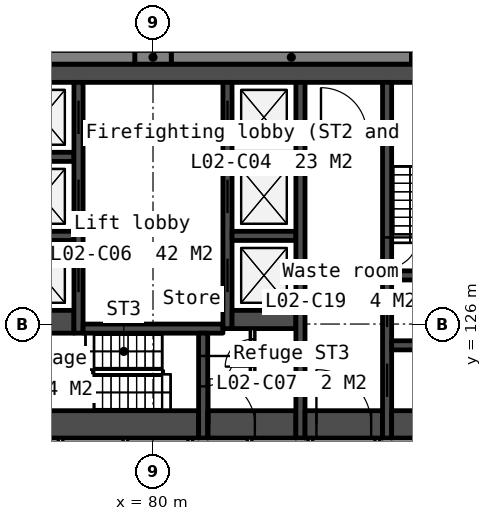
"""IFC4 building model, lengths in metres.
Left out: names, types, materials, properties, quantities, classifications, styles, units other than length and angle.
Written with IfcOpenShell. Run it as: python <this file> out.ifc"""

import sys

from ifc_helpers import new_model, si_unit, direction, frame, frame_2d, origin, place, context, subcontext, project, spatial, rectangle, extrude, element, fill, save


model = new_model("IFC4")
c1 = context("Model", 3, precision=1e-05, world=origin(), true_north=direction((0.0, 1.0)))
c2 = subcontext(c1, "Body", "Model", "MODEL_VIEW")
j1 = project(units=[si_unit("LENGTHUNIT", "METRE"), si_unit("PLANEANGLEUNIT", "RADIAN")], contexts=[c1])
p1 = place(None, origin())
s1 = spatial("IfcSite", under=j1, at=p1, CompositionType="ELEMENT")
p2 = place(p1, origin())
s2 = spatial("IfcBuilding", under=s1, at=p2, CompositionType="ELEMENT")
p3 = place(p2, frame((0.0, 0.0, 13.5)))
s3 = spatial("IfcBuildingStorey", under=s2, at=p3, CompositionType="ELEMENT", Elevation=13.5)
p4 = place(p3, frame((66.0, 134.25, 0.0), z_axis=(0.0, 0.0, 1.0), x_axis=(1.0, 0.0, 0.0)))
e1 = element("IfcWall", 1, at=p4, inside=s3, PredefinedType="SOLIDWALL", context=c2, shape_type="SweptSolid", body=[
    extrude(rectangle(XDim=28.0, YDim=0.6, at=frame_2d((14.0, 0.0))), origin(), (0.0, 0.0, 1.0), 5.75),
])
for number, where, z_axis, x_axis in (
    (2, (75.3, 131.5, 0.0), (0.0, 0.0, 1.0), (1.0, 0.0, 0.0)),
    (3, (75.3, 128.9, 0.0), (0.0, 0.0, 1.0), (1.0, 0.0, 0.0)),
):
    element("IfcWall", number, at=place(p3, frame(where, z_axis=z_axis, x_axis=x_axis)), inside=s3, PredefinedType="SOLIDWALL", context=c2, shape_type="SweptSolid", body=[
        extrude(rectangle(XDim=2.1, YDim=0.3, at=frame_2d((1.05, 0.0))), origin(), (0.0, 0.0, 1.0), 5.75),
    ])
p5 = place(p3, frame((75.3, 126.075, 0.0), z_axis=(0.0, 0.0, 1.0), x_axis=(1.0, 0.0, 0.0)))
e4 = element("IfcWall", 4, at=p5, inside=s3, PredefinedType="SOLIDWALL", context=c2, shape_type="SweptSolid", body=[
    extrude(rectangle(XDim=2.1, YDim=0.75, at=frame_2d((1.05, 0.0))), origin(), (0.0, 0.0, 1.0), 5.75),
])
p6 = place(p3, frame((75.3, 122.7, 0.0), z_axis=(0.0, 0.0, 1.0), x_axis=(1.0, 0.0, 0.0)))
e5 = element("IfcWall", 5, at=p6, inside=s3, PredefinedType="SOLIDWALL", context=c2, shape_type="SweptSolid", body=[
    extrude(rectangle(XDim=6.2, YDim=0.9, at=frame_2d((3.1, 0.0))), origin(), (0.0, 0.0, 1.0), 5.75),
])
p7 = place(p3, frame((76.958, 122.25, 0.0), z_axis=(0.0, 0.0, 1.0), x_axis=(0.0, -1.0, 0.0)))
e6 = element("IfcWall", 6, at=p7, inside=s3, PredefinedType="PARTITIONING", context=c2, shape_type="SweptSolid", body=[
    extrude(rectangle(XDim=2.1, YDim=0.15, at=frame_2d((1.05, 0.0))), origin(), (0.0, 0.0, 1.0), 5.75),
])
p8 = place(p3, frame((77.55, 133.95, 0.0), z_axis=(0.0, 0.0, 1.0), x_axis=(0.0, -1.0, 0.0)))
e7 = element("IfcWall", 7, at=p8, inside=s3, PredefinedType="SOLIDWALL", context=c2, shape_type="SweptSolid", body=[
    extrude(rectangle(XDim=8.25, YDim=0.3, at=frame_2d((4.125, 0.0))), origin(), (0.0, 0.0, 1.0), 5.75),
])
p9 = place(p8, frame((0.6, 0.0, 0.0)))
e8 = element("IfcOpeningElement", 8, at=p9, cuts=e7, PredefinedType="OPENING", context=c2, shape_type="SweptSolid", body=[
    extrude(rectangle(XDim=1.1, YDim=2.1, at=frame_2d((0.55, 1.05))), frame((0.0, 0.16, 0.0), z_axis=(0.0, -1.0, 0.0), x_axis=(1.0, 0.0, 0.0)), (0.0, 0.0, 1.0), 0.32),
])
p10 = place(p8, frame((3.2, 0.0, 0.0)))
e9 = element("IfcOpeningElement", 9, at=p10, cuts=e7, PredefinedType="OPENING", context=c2, shape_type="SweptSolid", body=[
    extrude(rectangle(XDim=1.1, YDim=2.1, at=frame_2d((0.55, 1.05))), frame((0.0, 0.16, 0.0), z_axis=(0.0, -1.0, 0.0), x_axis=(1.0, 0.0, 0.0)), (0.0, 0.0, 1.0), 0.32),
])
p11 = place(p8, frame((5.8, 0.0, 0.0)))
e10 = element("IfcOpeningElement", 10, at=p11, cuts=e7, PredefinedType="OPENING", context=c2, shape_type="SweptSolid", body=[
    extrude(rectangle(XDim=1.1, YDim=2.1, at=frame_2d((0.55, 1.05))), frame((0.0, 0.16, 0.0), z_axis=(0.0, -1.0, 0.0), x_axis=(1.0, 0.0, 0.0)), (0.0, 0.0, 1.0), 0.32),
])
p12 = place(p3, frame((77.7, 125.85, 0.0), z_axis=(0.0, 0.0, 1.0), x_axis=(1.0, 0.0, 0.0)))
e11 = element("IfcWall", 11, at=p12, inside=s3, PredefinedType="SOLIDWALL", context=c2, shape_type="SweptSolid", body=[
    extrude(rectangle(XDim=4.6, YDim=0.3, at=frame_2d((2.3, 0.0))), origin(), (0.0, 0.0, 1.0), 5.75),
])
for number, where, z_axis, x_axis in (
    (12, (79.092, 122.25, 0.0), (0.0, 0.0, 1.0), (0.0, -1.0, 0.0)),
    (13, (81.225, 122.25, 0.0), (0.0, 0.0, 1.0), (0.0, -1.0, 0.0)),
):
    element("IfcWall", number, at=place(p3, frame(where, z_axis=z_axis, x_axis=x_axis)), inside=s3, PredefinedType="PARTITIONING", context=c2, shape_type="SweptSolid", body=[
        extrude(rectangle(XDim=2.1, YDim=0.15, at=frame_2d((1.05, 0.0))), origin(), (0.0, 0.0, 1.0), 5.75),
    ])
p13 = place(p3, frame((81.65, 125.7, 0.0), z_axis=(0.0, 0.0, 1.0), x_axis=(0.0, -1.0, 0.0)))
e14 = element("IfcWall", 14, at=p13, inside=s3, PredefinedType="SOLIDWALL", context=c2, shape_type="SweptSolid", body=[
    extrude(rectangle(XDim=3.45, YDim=0.3, at=frame_2d((1.725, 0.0))), origin(), (0.0, 0.0, 1.0), 5.75),
])
p14 = place(p13, frame((0.75, 0.0, 0.0)))
e15 = element("IfcOpeningElement", 15, at=p14, cuts=e14, PredefinedType="OPENING", context=c2, shape_type="SweptSolid", body=[
    extrude(rectangle(XDim=1.0, YDim=2.1, at=frame_2d((0.5, 1.05))), frame((0.0, 0.16, 0.0), z_axis=(0.0, -1.0, 0.0), x_axis=(1.0, 0.0, 0.0)), (0.0, 0.0, 1.0), 0.32),
])
p15 = place(p3, frame((81.8, 122.7, 0.0), z_axis=(0.0, 0.0, 1.0), x_axis=(1.0, 0.0, 0.0)))
e16 = element("IfcWall", 16, at=p15, inside=s3, PredefinedType="SOLIDWALL", context=c2, shape_type="SweptSolid", body=[
    extrude(rectangle(XDim=2.9, YDim=0.9, at=frame_2d((1.45, 0.0))), origin(), (0.0, 0.0, 1.0), 5.75),
])
p16 = place(p15, frame((0.05, 0.0, 0.0)))
e17 = element("IfcOpeningElement", 17, at=p16, cuts=e16, PredefinedType="OPENING", context=c2, shape_type="SweptSolid", body=[
    extrude(rectangle(XDim=1.5, YDim=2.1, at=frame_2d((0.75, 1.05))), frame((0.0, 0.46, 0.0), z_axis=(0.0, -1.0, 0.0), x_axis=(1.0, 0.0, 0.0)), (0.0, 0.0, 1.0), 0.92),
])
p17 = place(p3, frame((82.45, 133.95, 0.0), z_axis=(0.0, 0.0, 1.0), x_axis=(0.0, -1.0, 0.0)))
e18 = element("IfcWall", 18, at=p17, inside=s3, PredefinedType="SOLIDWALL", context=c2, shape_type="SweptSolid", body=[
    extrude(rectangle(XDim=8.1, YDim=0.3, at=frame_2d((4.05, 0.0))), origin(), (0.0, 0.0, 1.0), 5.75),
])
p18 = place(p17, frame((0.6, 0.0, 0.0)))
e19 = element("IfcOpeningElement", 19, at=p18, cuts=e18, PredefinedType="OPENING", context=c2, shape_type="SweptSolid", body=[
    extrude(rectangle(XDim=1.1, YDim=2.1, at=frame_2d((0.55, 1.05))), frame((0.0, 0.16, 0.0), z_axis=(0.0, -1.0, 0.0), x_axis=(1.0, 0.0, 0.0)), (0.0, 0.0, 1.0), 0.32),
])
p19 = place(p17, frame((3.2, 0.0, 0.0)))
e20 = element("IfcOpeningElement", 20, at=p19, cuts=e18, PredefinedType="OPENING", context=c2, shape_type="SweptSolid", body=[
    extrude(rectangle(XDim=1.1, YDim=2.1, at=frame_2d((0.55, 1.05))), frame((0.0, 0.16, 0.0), z_axis=(0.0, -1.0, 0.0), x_axis=(1.0, 0.0, 0.0)), (0.0, 0.0, 1.0), 0.32),
])
p20 = place(p17, frame((5.8, 0.0, 0.0)))
e21 = element("IfcOpeningElement", 21, at=p20, cuts=e18, PredefinedType="OPENING", context=c2, shape_type="SweptSolid", body=[
    extrude(rectangle(XDim=1.1, YDim=2.1, at=frame_2d((0.55, 1.05))), frame((0.0, 0.16, 0.0), z_axis=(0.0, -1.0, 0.0), x_axis=(1.0, 0.0, 0.0)), (0.0, 0.0, 1.0), 0.32),
])
for number, where, z_axis, x_axis in (
    (22, (82.6, 131.5, 0.0), (0.0, 0.0, 1.0), (1.0, 0.0, 0.0)),
    (23, (82.6, 128.9, 0.0), (0.0, 0.0, 1.0), (1.0, 0.0, 0.0)),
):
    element("IfcWall", number, at=place(p3, frame(where, z_axis=z_axis, x_axis=x_axis)), inside=s3, PredefinedType="SOLIDWALL", context=c2, shape_type="SweptSolid", body=[
        extrude(rectangle(XDim=2.1, YDim=0.3, at=frame_2d((1.05, 0.0))), origin(), (0.0, 0.0, 1.0), 5.75),
    ])
p21 = place(p3, frame((82.6, 126.15, 0.0), z_axis=(0.0, 0.0, 1.0), x_axis=(1.0, 0.0, 0.0)))
e24 = element("IfcWall", 24, at=p21, inside=s3, PredefinedType="SOLIDWALL", context=c2, shape_type="SweptSolid", body=[
    extrude(rectangle(XDim=2.1, YDim=0.6, at=frame_2d((1.05, 0.0))), origin(), (0.0, 0.0, 1.0), 5.75),
])
p22 = place(p3, frame((83.175, 122.25, 0.0), z_axis=(0.0, 0.0, 1.0), x_axis=(0.0, -1.0, 0.0)))
e25 = element("IfcWall", 25, at=p22, inside=s3, PredefinedType="PARTITIONING", context=c2, shape_type="SweptSolid", body=[
    extrude(rectangle(XDim=2.1, YDim=0.15, at=frame_2d((1.05, 0.0))), origin(), (0.0, 0.0, 1.0), 5.75),
])
p23 = place(p3, frame((83.275, 125.85, 0.0), z_axis=(0.0, 0.0, 1.0), x_axis=(0.0, -1.0, 0.0)))
e26 = element("IfcWall", 26, at=p23, inside=s3, PredefinedType="PARTITIONING", context=c2, shape_type="SweptSolid", body=[
    extrude(rectangle(XDim=1.75, YDim=0.15, at=frame_2d((0.875, 0.0))), origin(), (0.0, 0.0, 1.0), 5.75),
])
p24 = place(p23, frame((0.35, 0.0, 0.0)))
e27 = element("IfcOpeningElement", 27, at=p24, cuts=e26, PredefinedType="OPENING", context=c2, shape_type="SweptSolid", body=[
    extrude(rectangle(XDim=0.9, YDim=2.1, at=frame_2d((0.45, 1.05))), frame((0.0, 0.085, 0.0), z_axis=(0.0, -1.0, 0.0), x_axis=(1.0, 0.0, 0.0)), (0.0, 0.0, 1.0), 0.17),
])
p25 = place(p3, frame((83.35, 124.175, 0.0), z_axis=(0.0, 0.0, 1.0), x_axis=(1.0, 0.0, 0.0)))
e28 = element("IfcWall", 28, at=p25, inside=s3, PredefinedType="PARTITIONING", context=c2, shape_type="SweptSolid", body=[
    extrude(rectangle(XDim=1.35, YDim=0.15, at=frame_2d((0.675, 0.0))), origin(), (0.0, 0.0, 1.0), 5.75),
])
p26 = place(p3, frame((84.85, 133.95, 0.0), z_axis=(0.0, 0.0, 1.0), x_axis=(0.0, -1.0, 0.0)))
e29 = element("IfcWall", 29, at=p26, inside=s3, PredefinedType="SOLIDWALL", context=c2, shape_type="SweptSolid", body=[
    extrude(rectangle(XDim=11.7, YDim=0.3, at=frame_2d((5.85, 0.0))), origin(), (0.0, 0.0, 1.0), 5.75),
])
p27 = place(p3, frame((85.0, 132.275, 0.0), z_axis=(0.0, 0.0, 1.0), x_axis=(1.0, 0.0, 0.0)))
e30 = element("IfcWall", 30, at=p27, inside=s3, PredefinedType="PARTITIONING", context=c2, shape_type="SweptSolid", body=[
    extrude(rectangle(XDim=2.55, YDim=0.15, at=frame_2d((1.275, 0.0))), origin(), (0.0, 0.0, 1.0), 5.75),
])
p28 = place(p27, frame((0.525, 0.0, 0.0)))
e31 = element("IfcOpeningElement", 31, at=p28, cuts=e30, PredefinedType="OPENING", context=c2, shape_type="SweptSolid", body=[
    extrude(rectangle(XDim=1.5, YDim=2.1, at=frame_2d((0.75, 1.05))), frame((0.0, 0.085, 0.0), z_axis=(0.0, -1.0, 0.0), x_axis=(1.0, 0.0, 0.0)), (0.0, 0.0, 1.0), 0.17),
])
p29 = place(p3, frame((85.0, 122.7, 0.0), z_axis=(0.0, 0.0, 1.0), x_axis=(1.0, 0.0, 0.0)))
e32 = element("IfcWall", 32, at=p29, inside=s3, PredefinedType="SOLIDWALL", context=c2, shape_type="SweptSolid", body=[
    extrude(rectangle(XDim=2.55, YDim=0.9, at=frame_2d((1.275, 0.0))), origin(), (0.0, 0.0, 1.0), 5.75),
])
p30 = place(p29, frame((0.375, 0.0, 0.0)))
e33 = element("IfcOpeningElement", 33, at=p30, cuts=e32, PredefinedType="OPENING", context=c2, shape_type="SweptSolid", body=[
    extrude(rectangle(XDim=1.8, YDim=2.1, at=frame_2d((0.9, 1.05))), frame((0.0, 0.46, 0.0), z_axis=(0.0, -1.0, 0.0), x_axis=(1.0, 0.0, 0.0)), (0.0, 0.0, 1.0), 0.92),
])
p31 = place(p3, frame((85.175, 122.25, 0.0), z_axis=(0.0, 0.0, 1.0), x_axis=(0.0, -1.0, 0.0)))
e34 = element("IfcWall", 34, at=p31, inside=s3, PredefinedType="PARTITIONING", context=c2, shape_type="SweptSolid", body=[
    extrude(rectangle(XDim=2.1, YDim=0.15, at=frame_2d((1.05, 0.0))), origin(), (0.0, 0.0, 1.0), 5.75),
])
p32 = place(p31, frame((0.55, 0.0, 0.0)))
e35 = element("IfcOpeningElement", 35, at=p32, cuts=e34, PredefinedType="OPENING", context=c2, shape_type="SweptSolid", body=[
    extrude(rectangle(XDim=1.0, YDim=2.1, at=frame_2d((0.5, 1.05))), frame((0.0, 0.085, 0.0), z_axis=(0.0, -1.0, 0.0), x_axis=(1.0, 0.0, 0.0)), (0.0, 0.0, 1.0), 0.17),
])
p33 = place(p3, frame((87.375, 122.25, 0.0), z_axis=(0.0, 0.0, 1.0), x_axis=(0.0, -1.0, 0.0)))
e36 = element("IfcWall", 36, at=p33, inside=s3, PredefinedType="PARTITIONING", context=c2, shape_type="SweptSolid", body=[
    extrude(rectangle(XDim=2.1, YDim=0.15, at=frame_2d((1.05, 0.0))), origin(), (0.0, 0.0, 1.0), 5.75),
])
p34 = place(p3, frame((87.7, 133.95, 0.0), z_axis=(0.0, 0.0, 1.0), x_axis=(0.0, -1.0, 0.0)))
e37 = element("IfcWall", 37, at=p34, inside=s3, PredefinedType="SOLIDWALL", context=c2, shape_type="SweptSolid", body=[
    extrude(rectangle(XDim=11.7, YDim=0.3, at=frame_2d((5.85, 0.0))), origin(), (0.0, 0.0, 1.0), 5.75),
])
p35 = place(p34, frame((6.95, 0.0, 0.0)))
e38 = element("IfcOpeningElement", 38, at=p35, cuts=e37, PredefinedType="OPENING", context=c2, shape_type="SweptSolid", body=[
    extrude(rectangle(XDim=1.1, YDim=2.1, at=frame_2d((0.55, 1.05))), frame((0.0, 0.16, 0.0), z_axis=(0.0, -1.0, 0.0), x_axis=(1.0, 0.0, 0.0)), (0.0, 0.0, 1.0), 0.32),
])
p36 = place(p34, frame((5.1, 0.0, 0.0)))
e39 = element("IfcOpeningElement", 39, at=p36, cuts=e37, PredefinedType="OPENING", context=c2, shape_type="SweptSolid", body=[
    extrude(rectangle(XDim=1.0, YDim=2.1, at=frame_2d((0.5, 1.05))), frame((0.0, 0.16, 0.0), z_axis=(0.0, -1.0, 0.0), x_axis=(1.0, 0.0, 0.0)), (0.0, 0.0, 1.0), 0.32),
])
p37 = place(p34, frame((9.25, 0.0, 0.0)))
e40 = element("IfcOpeningElement", 40, at=p37, cuts=e37, PredefinedType="OPENING", context=c2, shape_type="SweptSolid", body=[
    extrude(rectangle(XDim=1.1, YDim=2.1, at=frame_2d((0.55, 1.05))), frame((0.0, 0.16, 0.0), z_axis=(0.0, -1.0, 0.0), x_axis=(1.0, 0.0, 0.0)), (0.0, 0.0, 1.0), 0.32),
])
for number, where, z_axis, x_axis in (
    (41, (87.85, 127.6, 0.0), (0.0, 0.0, 1.0), (1.0, 0.0, 0.0)),
    (42, (87.85, 125.3, 0.0), (0.0, 0.0, 1.0), (1.0, 0.0, 0.0)),
):
    element("IfcWall", number, at=place(p3, frame(where, z_axis=z_axis, x_axis=x_axis)), inside=s3, PredefinedType="SOLIDWALL", context=c2, shape_type="SweptSolid", body=[
        extrude(rectangle(XDim=2.55, YDim=0.3, at=frame_2d((1.275, 0.0))), origin(), (0.0, 0.0, 1.0), 5.75),
    ])
p38 = place(p3, frame((87.85, 122.7, 0.0), z_axis=(0.0, 0.0, 1.0), x_axis=(1.0, 0.0, 0.0)))
e43 = element("IfcWall", 43, at=p38, inside=s3, PredefinedType="SOLIDWALL", context=c2, shape_type="SweptSolid", body=[
    extrude(rectangle(XDim=2.55, YDim=0.9, at=frame_2d((1.275, 0.0))), origin(), (0.0, 0.0, 1.0), 5.75),
])
p39 = place(p3, frame((89.699, 134.775, -0.3), z_axis=(0.0, 0.0, 1.0), x_axis=(-1.0, 0.0, 0.0)))
e44 = element("IfcWall", 44, at=p39, inside=s3, PredefinedType="SOLIDWALL", context=c2, shape_type="SweptSolid", body=[
    extrude(rectangle(XDim=1.2, YDim=0.45, at=frame_2d((0.6, 0.0))), origin(), (0.0, 0.0, 1.0), 5.363),
])
p40 = place(p3, frame((88.499, 134.775, -0.3), z_axis=(0.0, 0.0, 1.0), x_axis=(-1.0, 0.0, 0.0)))
e45 = element("IfcWall", 45, at=p40, inside=s3, PredefinedType="SOLIDWALL", context=c2, shape_type="SweptSolid", body=[
    extrude(rectangle(XDim=7.899, YDim=0.45, at=frame_2d((3.949, 0.0))), origin(), (0.0, 0.0, 1.0), 5.363),
])
p41 = place(p3, frame((80.6, 134.775, -0.3), z_axis=(0.0, 0.0, 1.0), x_axis=(-1.0, 0.0, 0.0)))
e46 = element("IfcWall", 46, at=p41, inside=s3, PredefinedType="SOLIDWALL", context=c2, shape_type="SweptSolid", body=[
    extrude(rectangle(XDim=1.2, YDim=0.45, at=frame_2d((0.6, 0.0))), origin(), (0.0, 0.0, 1.0), 5.363),
])
p42 = place(p3, frame((79.4, 134.775, -0.3), z_axis=(0.0, 0.0, 1.0), x_axis=(-1.0, 0.0, 0.0)))
e47 = element("IfcWall", 47, at=p42, inside=s3, PredefinedType="SOLIDWALL", context=c2, shape_type="SweptSolid", body=[
    extrude(rectangle(XDim=7.899, YDim=0.45, at=frame_2d((3.949, 0.0))), origin(), (0.0, 0.0, 1.0), 5.363),
])
for number, where, z_axis, x_axis in (
    (48, (133.302, 129.091, 0.0), (0.0, 0.0, 1.0), (-0.5, -0.866, 0.0)),
    (49, (77.166, 41.679, 0.0), (0.0, 0.0, 1.0), (-0.5, 0.866, 0.0)),
):
    element("IfcWall", number, at=place(p3, frame(where, z_axis=z_axis, x_axis=x_axis)), inside=s3, PredefinedType="STANDARD", context=c2, shape_type="SweptSolid", body=[
        extrude(rectangle(XDim=100.935, YDim=1.0, at=frame_2d((50.467, 0.0))), origin(), (0.0, 0.0, 1.0), 0.6),
    ])
p43 = place(p9, origin())
e50 = element("IfcDoor", 50, at=p43, inside=s3, OperationType="SLIDING_TO_RIGHT", PredefinedType="DOOR", context=c2, shape_type="SweptSolid", body=[
    extrude(rectangle(XDim=1.1, YDim=2.1, at=frame_2d((0.55, 1.05))), frame((0.0, 0.025, 0.0), z_axis=(0.0, -1.0, 0.0), x_axis=(1.0, 0.0, 0.0)), (0.0, 0.0, 1.0), 0.05),
])
fill(e8, e50)
p44 = place(p10, origin())
e51 = element("IfcDoor", 51, at=p44, inside=s3, OperationType="SLIDING_TO_RIGHT", PredefinedType="DOOR", context=c2, shape_type="SweptSolid", body=[
    extrude(rectangle(XDim=1.1, YDim=2.1, at=frame_2d((0.55, 1.05))), frame((0.0, 0.025, 0.0), z_axis=(0.0, -1.0, 0.0), x_axis=(1.0, 0.0, 0.0)), (0.0, 0.0, 1.0), 0.05),
])
fill(e9, e51)
p45 = place(p11, origin())
e52 = element("IfcDoor", 52, at=p45, inside=s3, OperationType="SLIDING_TO_RIGHT", PredefinedType="DOOR", context=c2, shape_type="SweptSolid", body=[
    extrude(rectangle(XDim=1.1, YDim=2.1, at=frame_2d((0.55, 1.05))), frame((0.0, 0.025, 0.0), z_axis=(0.0, -1.0, 0.0), x_axis=(1.0, 0.0, 0.0)), (0.0, 0.0, 1.0), 0.05),
])
fill(e10, e52)
p46 = place(p18, origin())
e53 = element("IfcDoor", 53, at=p46, inside=s3, OperationType="SLIDING_TO_LEFT", PredefinedType="DOOR", context=c2, shape_type="SweptSolid", body=[
    extrude(rectangle(XDim=1.1, YDim=2.1, at=frame_2d((0.55, 1.05))), frame((0.0, 0.025, 0.0), z_axis=(0.0, -1.0, 0.0), x_axis=(1.0, 0.0, 0.0)), (0.0, 0.0, 1.0), 0.05),
])
fill(e19, e53)
p47 = place(p19, origin())
e54 = element("IfcDoor", 54, at=p47, inside=s3, OperationType="SLIDING_TO_LEFT", PredefinedType="DOOR", context=c2, shape_type="SweptSolid", body=[
    extrude(rectangle(XDim=1.1, YDim=2.1, at=frame_2d((0.55, 1.05))), frame((0.0, 0.025, 0.0), z_axis=(0.0, -1.0, 0.0), x_axis=(1.0, 0.0, 0.0)), (0.0, 0.0, 1.0), 0.05),
])
fill(e20, e54)
p48 = place(p20, origin())
e55 = element("IfcDoor", 55, at=p48, inside=s3, OperationType="SLIDING_TO_LEFT", PredefinedType="DOOR", context=c2, shape_type="SweptSolid", body=[
    extrude(rectangle(XDim=1.1, YDim=2.1, at=frame_2d((0.55, 1.05))), frame((0.0, 0.025, 0.0), z_axis=(0.0, -1.0, 0.0), x_axis=(1.0, 0.0, 0.0)), (0.0, 0.0, 1.0), 0.05),
])
fill(e21, e55)
p49 = place(p35, origin())
e56 = element("IfcDoor", 56, at=p49, inside=s3, OperationType="SLIDING_TO_LEFT", PredefinedType="DOOR", context=c2, shape_type="SweptSolid", body=[
    extrude(rectangle(XDim=1.1, YDim=2.1, at=frame_2d((0.55, 1.05))), frame((0.0, 0.025, 0.0), z_axis=(0.0, -1.0, 0.0), x_axis=(1.0, 0.0, 0.0)), (0.0, 0.0, 1.0), 0.05),
])
fill(e38, e56)
p50 = place(p30, origin())
e57 = element("IfcDoor", 57, at=p50, inside=s3, OperationType="DOUBLE_DOOR_DOUBLE_SWING", PredefinedType="DOOR", context=c2, shape_type="SweptSolid", body=[
    extrude(rectangle(XDim=1.8, YDim=2.1, at=frame_2d((0.9, 1.05))), frame((0.0, 0.025, 0.0), z_axis=(0.0, -1.0, 0.0), x_axis=(1.0, 0.0, 0.0)), (0.0, 0.0, 1.0), 0.05),
])
fill(e33, e57)
p51 = place(p16, origin())
e58 = element("IfcDoor", 58, at=p51, inside=s3, OperationType="DOUBLE_DOOR_DOUBLE_SWING", PredefinedType="DOOR", context=c2, shape_type="SweptSolid", body=[
    extrude(rectangle(XDim=1.5, YDim=2.1, at=frame_2d((0.75, 1.05))), frame((0.0, 0.025, 0.0), z_axis=(0.0, -1.0, 0.0), x_axis=(1.0, 0.0, 0.0)), (0.0, 0.0, 1.0), 0.05),
])
fill(e17, e58)
p52 = place(p24, origin())
e59 = element("IfcDoor", 59, at=p52, inside=s3, OperationType="SINGLE_SWING_RIGHT", PredefinedType="DOOR", context=c2, shape_type="SweptSolid", body=[
    extrude(rectangle(XDim=0.9, YDim=2.1, at=frame_2d((0.45, 1.05))), frame((0.0, 0.025, 0.0), z_axis=(0.0, -1.0, 0.0), x_axis=(1.0, 0.0, 0.0)), (0.0, 0.0, 1.0), 0.05),
])
fill(e27, e59)
p53 = place(p28, origin())
e60 = element("IfcDoor", 60, at=p53, inside=s3, OperationType="DOUBLE_DOOR_DOUBLE_SWING", PredefinedType="DOOR", context=c2, shape_type="SweptSolid", body=[
    extrude(rectangle(XDim=1.5, YDim=2.1, at=frame_2d((0.75, 1.05))), frame((0.0, 0.025, 0.0), z_axis=(0.0, -1.0, 0.0), x_axis=(1.0, 0.0, 0.0)), (0.0, 0.0, 1.0), 0.05),
])
fill(e31, e60)
p54 = place(p36, origin())
e61 = element("IfcDoor", 61, at=p54, inside=s3, OperationType="SINGLE_SWING_LEFT", PredefinedType="DOOR", context=c2, shape_type="SweptSolid", body=[
    extrude(rectangle(XDim=1.0, YDim=2.1, at=frame_2d((0.5, 1.05))), frame((0.0, 0.025, 0.0), z_axis=(0.0, -1.0, 0.0), x_axis=(1.0, 0.0, 0.0)), (0.0, 0.0, 1.0), 0.05),
])
fill(e39, e61)
p55 = place(p14, origin())
e62 = element("IfcDoor", 62, at=p55, inside=s3, OperationType="SINGLE_SWING_LEFT", PredefinedType="DOOR", context=c2, shape_type="SweptSolid", body=[
    extrude(rectangle(XDim=1.0, YDim=2.1, at=frame_2d((0.5, 1.05))), frame((0.0, 0.025, 0.0), z_axis=(0.0, -1.0, 0.0), x_axis=(1.0, 0.0, 0.0)), (0.0, 0.0, 1.0), 0.05),
])
fill(e15, e62)
p56 = place(p37, origin())
e63 = element("IfcDoor", 63, at=p56, inside=s3, OperationType="SLIDING_TO_LEFT", PredefinedType="DOOR", context=c2, shape_type="SweptSolid", body=[
    extrude(rectangle(XDim=1.1, YDim=2.1, at=frame_2d((0.55, 1.05))), frame((0.0, 0.025, 0.0), z_axis=(0.0, -1.0, 0.0), x_axis=(1.0, 0.0, 0.0)), (0.0, 0.0, 1.0), 0.05),
])
fill(e40, e63)
save(model, sys.argv[1])
